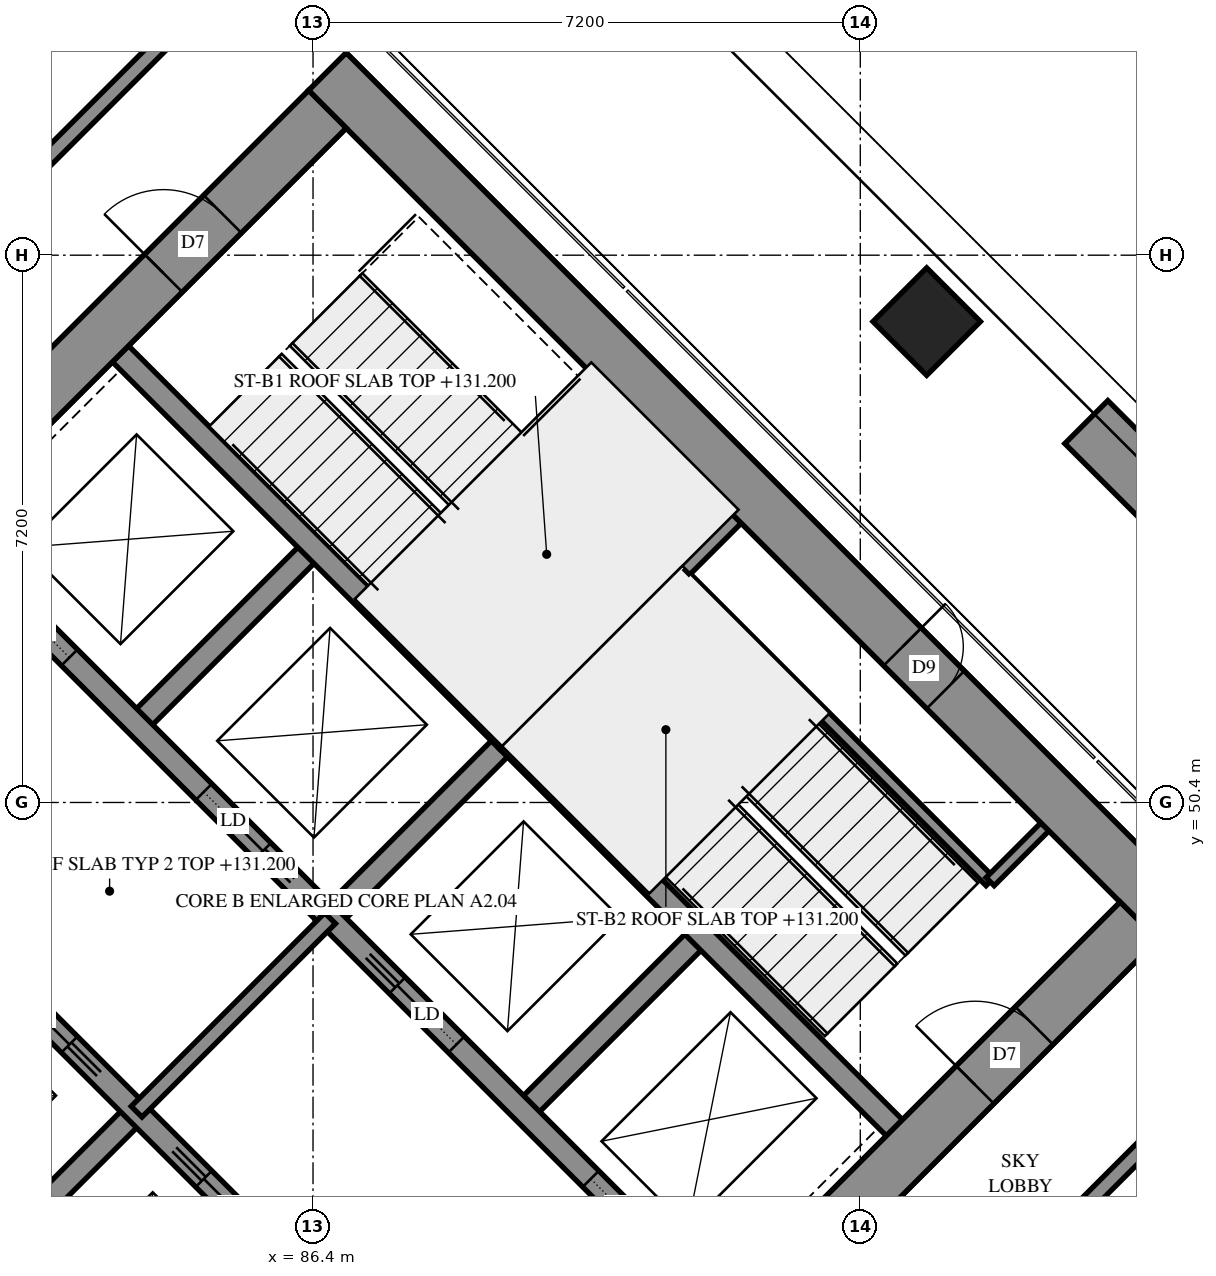
"""IFC4 building model, lengths in metres.
Left out: names, types, materials, properties, quantities, classifications, styles, units other than length and angle.
Written with IfcOpenShell. Run it as: python <this file> out.ifc"""

import sys

from ifc_helpers import new_model, si_unit, direction, frame, frame_2d, origin, origin_2d, place, context, subcontext, project, spatial, rectangle, extrude, element, fill, save


model = new_model("IFC4")
c1 = context("Model", 3, precision=1e-05, world=origin(), true_north=direction((0.0, 1.0)))
c2 = subcontext(c1, "Body", "Model", "MODEL_VIEW")
j1 = project(units=[si_unit("LENGTHUNIT", "METRE"), si_unit("PLANEANGLEUNIT", "RADIAN")], contexts=[c1])
p1 = place(None, origin())
s1 = spatial("IfcSite", under=j1, at=p1, CompositionType="ELEMENT")
p2 = place(p1, origin())
s2 = spatial("IfcBuilding", under=s1, at=p2, CompositionType="ELEMENT")
p3 = place(p2, frame((0.0, 0.0, 131.2)))
s3 = spatial("IfcBuildingStorey", under=s2, at=p3, CompositionType="ELEMENT", Elevation=131.2)
p4 = place(p3, frame((94.474, 56.727, 0.0), z_axis=(0.0, 0.0, 1.0), x_axis=(0.7071067812, -0.7071067812, 0.0)))
e1 = element("IfcColumn", 1, at=p4, inside=s3, PredefinedType="COLUMN", context=c2, shape_type="SweptSolid", body=[
    extrude(rectangle(XDim=1.0, YDim=1.0, at=origin_2d()), origin(), (0.0, 0.0, 1.0), 3.9),
])
p5 = place(p3, frame((75.912, 49.337, -0.3), z_axis=(0.0, 0.0, 1.0), x_axis=(0.7071036166, -0.7071099457, 0.0)))
e2 = element("IfcWall", 2, at=p5, inside=s3, PredefinedType="SHEAR", context=c2, shape_type="SweptSolid", body=[
    extrude(rectangle(XDim=15.8, YDim=0.7, at=frame_2d((7.9, 0.0))), origin(), (0.0, 0.0, 1.0), 3.5),
])
p6 = place(p3, frame((86.589, 60.014, -0.3), z_axis=(0.0, 0.0, 1.0), x_axis=(0.7071099457, -0.7071036166, 0.0)))
e3 = element("IfcWall", 3, at=p6, inside=s3, PredefinedType="SHEAR", context=c2, shape_type="SweptSolid", body=[
    extrude(rectangle(XDim=15.8, YDim=0.7, at=frame_2d((7.9, 0.0))), origin(), (0.0, 0.0, 1.0), 3.5),
])
p7 = place(p6, frame((10.7, 0.0, 0.3)))
e4 = element("IfcOpeningElement", 4, at=p7, cuts=e3, PredefinedType="OPENING", context=c2, shape_type="SweptSolid", body=[
    extrude(rectangle(XDim=0.8, YDim=2.1, at=frame_2d((0.4, 1.05))), frame((0.0, 0.36, 0.0), z_axis=(0.0, -1.0, 0.0), x_axis=(1.0, 0.0, 0.0)), (0.0, 0.0, 1.0), 0.72),
])
p8 = place(p3, frame((76.407, 49.337, -0.3), z_axis=(0.0, 0.0, 1.0), x_axis=(0.7071067812, 0.7071067812, 0.0)))
e5 = element("IfcWall", 5, at=p8, inside=s3, PredefinedType="SHEAR", context=c2, shape_type="SweptSolid", body=[
    extrude(rectangle(XDim=14.4, YDim=0.7, at=frame_2d((7.2, 0.0))), origin(), (0.0, 0.0, 1.0), 3.5),
])
p9 = place(p8, frame((4.55, 0.0, 0.3)))
e6 = element("IfcOpeningElement", 6, at=p9, cuts=e5, PredefinedType="OPENING", context=c2, shape_type="SweptSolid", body=[
    extrude(rectangle(XDim=1.1, YDim=2.1, at=frame_2d((0.55, 1.05))), frame((0.0, 0.36, 0.0), z_axis=(0.0, -1.0, 0.0), x_axis=(1.0, 0.0, 0.0)), (0.0, 0.0, 1.0), 0.72),
])
p10 = place(p8, frame((11.35, 0.0, 0.3)))
e7 = element("IfcOpeningElement", 7, at=p10, cuts=e5, PredefinedType="OPENING", context=c2, shape_type="SweptSolid", body=[
    extrude(rectangle(XDim=1.1, YDim=2.1, at=frame_2d((0.55, 1.05))), frame((0.0, 0.36, 0.0), z_axis=(0.0, -1.0, 0.0), x_axis=(1.0, 0.0, 0.0)), (0.0, 0.0, 1.0), 0.72),
])
p11 = place(p3, frame((87.084, 38.66, -0.3), z_axis=(0.0, 0.0, 1.0), x_axis=(0.7071067812, 0.7071067812, 0.0)))
e8 = element("IfcWall", 8, at=p11, inside=s3, PredefinedType="SHEAR", context=c2, shape_type="SweptSolid", body=[
    extrude(rectangle(XDim=14.4, YDim=0.7, at=frame_2d((7.2, 0.0))), origin(), (0.0, 0.0, 1.0), 3.5),
])
p12 = place(p11, frame((4.55, 0.0, 0.3)))
e9 = element("IfcOpeningElement", 9, at=p12, cuts=e8, PredefinedType="OPENING", context=c2, shape_type="SweptSolid", body=[
    extrude(rectangle(XDim=1.1, YDim=2.1, at=frame_2d((0.55, 1.05))), frame((0.0, 0.36, 0.0), z_axis=(0.0, -1.0, 0.0), x_axis=(1.0, 0.0, 0.0)), (0.0, 0.0, 1.0), 0.72),
])
p13 = place(p11, frame((11.35, 0.0, 0.3)))
e10 = element("IfcOpeningElement", 10, at=p13, cuts=e8, PredefinedType="OPENING", context=c2, shape_type="SweptSolid", body=[
    extrude(rectangle(XDim=1.1, YDim=2.1, at=frame_2d((0.55, 1.05))), frame((0.0, 0.36, 0.0), z_axis=(0.0, -1.0, 0.0), x_axis=(1.0, 0.0, 0.0)), (0.0, 0.0, 1.0), 0.72),
])
p14 = place(p3, frame((84.079, 51.423, 0.0), z_axis=(0.0, 0.0, 1.0), x_axis=(0.7071219326, 0.7070916295, 0.0)))
e11 = element("IfcWall", 11, at=p14, inside=s3, PredefinedType="SOLIDWALL", context=c2, shape_type="SweptSolid", body=[
    extrude(rectangle(XDim=3.3, YDim=0.3, at=frame_2d((1.65, 0.0))), origin(), (0.0, 0.0, 1.0), 3.9),
])
p15 = place(p3, frame((81.746, 43.999, 0.0), z_axis=(0.0, 0.0, 1.0), x_axis=(0.7071067812, 0.7071067812, 0.0)))
e12 = element("IfcWall", 12, at=p15, inside=s3, PredefinedType="SOLIDWALL", context=c2, shape_type="SweptSolid", body=[
    extrude(rectangle(XDim=3.3, YDim=0.3, at=frame_2d((1.65, 0.0))), origin(), (0.0, 0.0, 1.0), 3.9),
])
for number, where, z_axis, x_axis in (
    (13, (86.625, 48.878, 0.0), (0.0, 0.0, 1.0), (0.707, 0.707, 0.0)),
    (14, (89.17, 46.332, 0.0), (0.0, 0.0, 1.0), (0.707, 0.707, 0.0)),
):
    element("IfcWall", number, at=place(p3, frame(where, z_axis=z_axis, x_axis=x_axis)), inside=s3, PredefinedType="SOLIDWALL", context=c2, shape_type="SweptSolid", body=[
        extrude(rectangle(XDim=3.3, YDim=0.3, at=frame_2d((1.65, 0.0))), origin(), (0.0, 0.0, 1.0), 3.9),
    ])
p16 = place(p3, frame((78.988, 51.423, 0.0), z_axis=(0.0, 0.0, 1.0), x_axis=(0.7071067812, -0.7071067812, 0.0)))
e15 = element("IfcWall", 15, at=p16, inside=s3, PredefinedType="SOLIDWALL", context=c2, shape_type="SweptSolid", body=[
    extrude(rectangle(XDim=14.4, YDim=0.3, at=frame_2d((7.2, 0.0))), origin(), (0.0, 0.0, 1.0), 3.9),
])
p17 = place(p16, frame((1.25, 0.0, 0.0)))
e16 = element("IfcOpeningElement", 16, at=p17, cuts=e15, PredefinedType="OPENING", context=c2, shape_type="SweptSolid", body=[
    extrude(rectangle(XDim=1.1, YDim=2.1, at=frame_2d((0.55, 1.05))), frame((0.0, 0.16, 0.0), z_axis=(0.0, -1.0, 0.0), x_axis=(1.0, 0.0, 0.0)), (0.0, 0.0, 1.0), 0.32),
])
p18 = place(p16, frame((4.85, 0.0, 0.0)))
e17 = element("IfcOpeningElement", 17, at=p18, cuts=e15, PredefinedType="OPENING", context=c2, shape_type="SweptSolid", body=[
    extrude(rectangle(XDim=1.1, YDim=2.1, at=frame_2d((0.55, 1.05))), frame((0.0, 0.16, 0.0), z_axis=(0.0, -1.0, 0.0), x_axis=(1.0, 0.0, 0.0)), (0.0, 0.0, 1.0), 0.32),
])
p19 = place(p16, frame((8.45, 0.0, 0.0)))
e18 = element("IfcOpeningElement", 18, at=p19, cuts=e15, PredefinedType="OPENING", context=c2, shape_type="SweptSolid", body=[
    extrude(rectangle(XDim=1.1, YDim=2.1, at=frame_2d((0.55, 1.05))), frame((0.0, 0.16, 0.0), z_axis=(0.0, -1.0, 0.0), x_axis=(1.0, 0.0, 0.0)), (0.0, 0.0, 1.0), 0.32),
])
p20 = place(p16, frame((12.05, 0.0, 0.0)))
e19 = element("IfcOpeningElement", 19, at=p20, cuts=e15, PredefinedType="OPENING", context=c2, shape_type="SweptSolid", body=[
    extrude(rectangle(XDim=1.1, YDim=2.1, at=frame_2d((0.55, 1.05))), frame((0.0, 0.16, 0.0), z_axis=(0.0, -1.0, 0.0), x_axis=(1.0, 0.0, 0.0)), (0.0, 0.0, 1.0), 0.32),
])
p21 = place(p3, frame((81.534, 53.969, 0.0), z_axis=(0.0, 0.0, 1.0), x_axis=(0.707103309, -0.7071102534, 0.0)))
e20 = element("IfcWall", 20, at=p21, inside=s3, PredefinedType="SOLIDWALL", context=c2, shape_type="SweptSolid", body=[
    extrude(rectangle(XDim=14.4, YDim=0.3, at=frame_2d((7.2, 0.0))), origin(), (0.0, 0.0, 1.0), 3.9),
])
p22 = place(p21, frame((1.25, 0.0, 0.0)))
e21 = element("IfcOpeningElement", 21, at=p22, cuts=e20, PredefinedType="OPENING", context=c2, shape_type="SweptSolid", body=[
    extrude(rectangle(XDim=1.1, YDim=2.1, at=frame_2d((0.55, 1.05))), frame((0.0, 0.16, 0.0), z_axis=(0.0, -1.0, 0.0), x_axis=(1.0, 0.0, 0.0)), (0.0, 0.0, 1.0), 0.32),
])
p23 = place(p21, frame((4.85, 0.0, 0.0)))
e22 = element("IfcOpeningElement", 22, at=p23, cuts=e20, PredefinedType="OPENING", context=c2, shape_type="SweptSolid", body=[
    extrude(rectangle(XDim=1.1, YDim=2.1, at=frame_2d((0.55, 1.05))), frame((0.0, 0.16, 0.0), z_axis=(0.0, -1.0, 0.0), x_axis=(1.0, 0.0, 0.0)), (0.0, 0.0, 1.0), 0.32),
])
p24 = place(p21, frame((8.45, 0.0, 0.0)))
e23 = element("IfcOpeningElement", 23, at=p24, cuts=e20, PredefinedType="OPENING", context=c2, shape_type="SweptSolid", body=[
    extrude(rectangle(XDim=1.1, YDim=2.1, at=frame_2d((0.55, 1.05))), frame((0.0, 0.16, 0.0), z_axis=(0.0, -1.0, 0.0), x_axis=(1.0, 0.0, 0.0)), (0.0, 0.0, 1.0), 0.32),
])
p25 = place(p21, frame((12.05, 0.0, 0.0)))
e24 = element("IfcOpeningElement", 24, at=p25, cuts=e20, PredefinedType="OPENING", context=c2, shape_type="SweptSolid", body=[
    extrude(rectangle(XDim=1.1, YDim=2.1, at=frame_2d((0.55, 1.05))), frame((0.0, 0.16, 0.0), z_axis=(0.0, -1.0, 0.0), x_axis=(1.0, 0.0, 0.0)), (0.0, 0.0, 1.0), 0.32),
])
for number, where, z_axis, x_axis in (
    (25, (83.867, 56.302, 0.0), (0.0, 0.0, 1.0), (0.707, -0.707, 0.0)),
    (26, (88.958, 51.211, 0.0), (0.0, 0.0, 1.0), (0.707, -0.707, 0.0)),
):
    element("IfcWall", number, at=place(p3, frame(where, z_axis=z_axis, x_axis=x_axis)), inside=s3, PredefinedType="SOLIDWALL", context=c2, shape_type="SweptSolid", body=[
        extrude(rectangle(XDim=7.2, YDim=0.3, at=frame_2d((3.6, 0.0))), origin(), (0.0, 0.0, 1.0), 3.9),
    ])
p26 = place(p3, frame((88.958, 51.211, 0.0), z_axis=(0.0, 0.0, 1.0), x_axis=(0.7071067812, 0.7071067812, 0.0)))
e27 = element("IfcWall", 27, at=p26, inside=s3, PredefinedType="SOLIDWALL", context=c2, shape_type="SweptSolid", body=[
    extrude(rectangle(XDim=4.2, YDim=0.3, at=frame_2d((2.1, 0.0))), origin(), (0.0, 0.0, 1.0), 3.9),
])
p27 = place(p3, frame((98.243, 53.735, 0.0), z_axis=(0.0, 0.0, 1.0), x_axis=(-0.7071067812, 0.7071067812, 0.0)))
e28 = element("IfcWall", 28, at=p27, inside=s3, PredefinedType="SOLIDWALL", context=c2, shape_type="SweptSolid", body=[
    extrude(rectangle(XDim=2.361, YDim=0.8, at=frame_2d((1.18, 0.0))), origin(), (0.0, 0.0, 1.0), 0.65),
])
p28 = place(p3, frame((91.313, 53.354, 0.0), z_axis=(0.0, 0.0, 1.0), x_axis=(0.7071067812, -0.7071067812, 0.0)))
e29 = element("IfcWall", 29, at=p28, inside=s3, PredefinedType="PARTITIONING", context=c2, shape_type="SweptSolid", body=[
    extrude(rectangle(XDim=5.65, YDim=0.15, at=frame_2d((2.825, 0.0))), origin(), (0.0, 0.0, 1.0), 3.9),
])
p29 = place(p3, frame((95.308, 49.358, 0.0), z_axis=(0.0, 0.0, 1.0), x_axis=(0.70705776, 0.707155799, 0.0)))
e30 = element("IfcWall", 30, at=p29, inside=s3, PredefinedType="PARTITIONING", context=c2, shape_type="SweptSolid", body=[
    extrude(rectangle(XDim=1.02, YDim=0.15, at=frame_2d((0.51, 0.0))), origin(), (0.0, 0.0, 1.0), 3.9),
])
p30 = place(p3, frame((84.079, 46.332, 0.0), z_axis=(0.0, 0.0, 1.0), x_axis=(0.7071067812, 0.7071067812, 0.0)))
e31 = element("IfcWall", 31, at=p30, inside=s3, PredefinedType="PARTITIONING", context=c2, shape_type="SweptSolid", body=[
    extrude(rectangle(XDim=3.6, YDim=0.2, at=frame_2d((1.8, 0.0))), origin(), (0.0, 0.0, 1.0), 3.9),
])
p31 = place(p3, frame((94.332, 42.868, 0.0), z_axis=(0.0, 0.0, 1.0), x_axis=(0.7071067812, 0.7071067812, 0.0)))
e32 = element("IfcWall", 32, at=p31, inside=s3, PredefinedType="PARTITIONING", context=c2, shape_type="SweptSolid", body=[
    extrude(rectangle(XDim=7.371, YDim=0.2, at=frame_2d((3.685, 0.0))), origin(), (0.0, 0.0, 1.0), 3.9),
])
p32 = place(p3, frame((80.951, 56.923, 0.0), z_axis=(0.0, 0.0, 1.0), x_axis=(0.7071067812, 0.7071067812, 0.0)))
e33 = element("IfcWall", 33, at=p32, inside=s3, PredefinedType="PARTITIONING", context=c2, shape_type="SweptSolid", body=[
    extrude(rectangle(XDim=6.893, YDim=0.2, at=frame_2d((3.446, 0.0))), origin(), (0.0, 0.0, 1.0), 3.9),
])
p33 = place(p32, frame((0.832, 0.0, 0.0)))
e34 = element("IfcOpeningElement", 34, at=p33, cuts=e33, PredefinedType="OPENING", context=c2, shape_type="SweptSolid", body=[
    extrude(rectangle(XDim=1.0, YDim=2.1, at=frame_2d((0.5, 1.05))), frame((0.0, 0.11, 0.0), z_axis=(0.0, -1.0, 0.0), x_axis=(1.0, 0.0, 0.0)), (0.0, 0.0, 1.0), 0.22),
])
p34 = place(p7, origin())
e35 = element("IfcDoor", 35, at=p34, inside=s3, OperationType="SINGLE_SWING_RIGHT", PredefinedType="DOOR", context=c2, shape_type="SweptSolid", body=[
    extrude(rectangle(XDim=0.8, YDim=2.1, at=frame_2d((0.4, 1.05))), frame((0.0, -0.29, 0.0), z_axis=(0.0, -1.0, 0.0), x_axis=(1.0, 0.0, 0.0)), (0.0, 0.0, 1.0), 0.05),
])
fill(e4, e35)
p35 = place(p10, origin())
e36 = element("IfcDoor", 36, at=p35, inside=s3, OperationType="SINGLE_SWING_LEFT", PredefinedType="DOOR", context=c2, shape_type="SweptSolid", body=[
    extrude(rectangle(XDim=1.1, YDim=2.1, at=frame_2d((0.55, 1.05))), frame((0.0, 0.025, 0.0), z_axis=(0.0, -1.0, 0.0), x_axis=(1.0, 0.0, 0.0)), (0.0, 0.0, 1.0), 0.05),
])
fill(e7, e36)
p36 = place(p13, origin())
e37 = element("IfcDoor", 37, at=p36, inside=s3, OperationType="SINGLE_SWING_RIGHT", PredefinedType="DOOR", context=c2, shape_type="SweptSolid", body=[
    extrude(rectangle(XDim=1.1, YDim=2.1, at=frame_2d((0.55, 1.05))), frame((0.0, 0.025, 0.0), z_axis=(0.0, -1.0, 0.0), x_axis=(1.0, 0.0, 0.0)), (0.0, 0.0, 1.0), 0.05),
])
fill(e10, e37)
p37 = place(p18, origin())
e38 = element("IfcDoor", 38, at=p37, inside=s3, OperationType="SLIDING_TO_RIGHT", PredefinedType="DOOR", context=c2, shape_type="SweptSolid", body=[
    extrude(rectangle(XDim=1.1, YDim=2.1, at=frame_2d((0.55, 1.05))), frame((0.0, 0.025, 0.0), z_axis=(0.0, -1.0, 0.0), x_axis=(1.0, 0.0, 0.0)), (0.0, 0.0, 1.0), 0.05),
])
fill(e17, e38)
p38 = place(p19, origin())
e39 = element("IfcDoor", 39, at=p38, inside=s3, OperationType="SLIDING_TO_LEFT", PredefinedType="DOOR", context=c2, shape_type="SweptSolid", body=[
    extrude(rectangle(XDim=1.1, YDim=2.1, at=frame_2d((0.55, 1.05))), frame((0.0, 0.025, 0.0), z_axis=(0.0, -1.0, 0.0), x_axis=(1.0, 0.0, 0.0)), (0.0, 0.0, 1.0), 0.05),
])
fill(e18, e39)
p39 = place(p22, origin())
e40 = element("IfcDoor", 40, at=p39, inside=s3, OperationType="SLIDING_TO_LEFT", PredefinedType="DOOR", context=c2, shape_type="SweptSolid", body=[
    extrude(rectangle(XDim=1.1, YDim=2.1, at=frame_2d((0.55, 1.05))), frame((0.0, 0.025, 0.0), z_axis=(0.0, -1.0, 0.0), x_axis=(1.0, 0.0, 0.0)), (0.0, 0.0, 1.0), 0.05),
])
fill(e21, e40)
p40 = place(p23, origin())
e41 = element("IfcDoor", 41, at=p40, inside=s3, OperationType="SLIDING_TO_RIGHT", PredefinedType="DOOR", context=c2, shape_type="SweptSolid", body=[
    extrude(rectangle(XDim=1.1, YDim=2.1, at=frame_2d((0.55, 1.05))), frame((0.0, 0.025, 0.0), z_axis=(0.0, -1.0, 0.0), x_axis=(1.0, 0.0, 0.0)), (0.0, 0.0, 1.0), 0.05),
])
fill(e22, e41)
p41 = place(p24, origin())
e42 = element("IfcDoor", 42, at=p41, inside=s3, OperationType="SLIDING_TO_LEFT", PredefinedType="DOOR", context=c2, shape_type="SweptSolid", body=[
    extrude(rectangle(XDim=1.1, YDim=2.1, at=frame_2d((0.55, 1.05))), frame((0.0, 0.025, 0.0), z_axis=(0.0, -1.0, 0.0), x_axis=(1.0, 0.0, 0.0)), (0.0, 0.0, 1.0), 0.05),
])
fill(e23, e42)
p42 = place(p25, origin())
e43 = element("IfcDoor", 43, at=p42, inside=s3, OperationType="SLIDING_TO_RIGHT", PredefinedType="DOOR", context=c2, shape_type="SweptSolid", body=[
    extrude(rectangle(XDim=1.1, YDim=2.1, at=frame_2d((0.55, 1.05))), frame((0.0, 0.025, 0.0), z_axis=(0.0, -1.0, 0.0), x_axis=(1.0, 0.0, 0.0)), (0.0, 0.0, 1.0), 0.05),
])
fill(e24, e43)
save(model, sys.argv[1])
